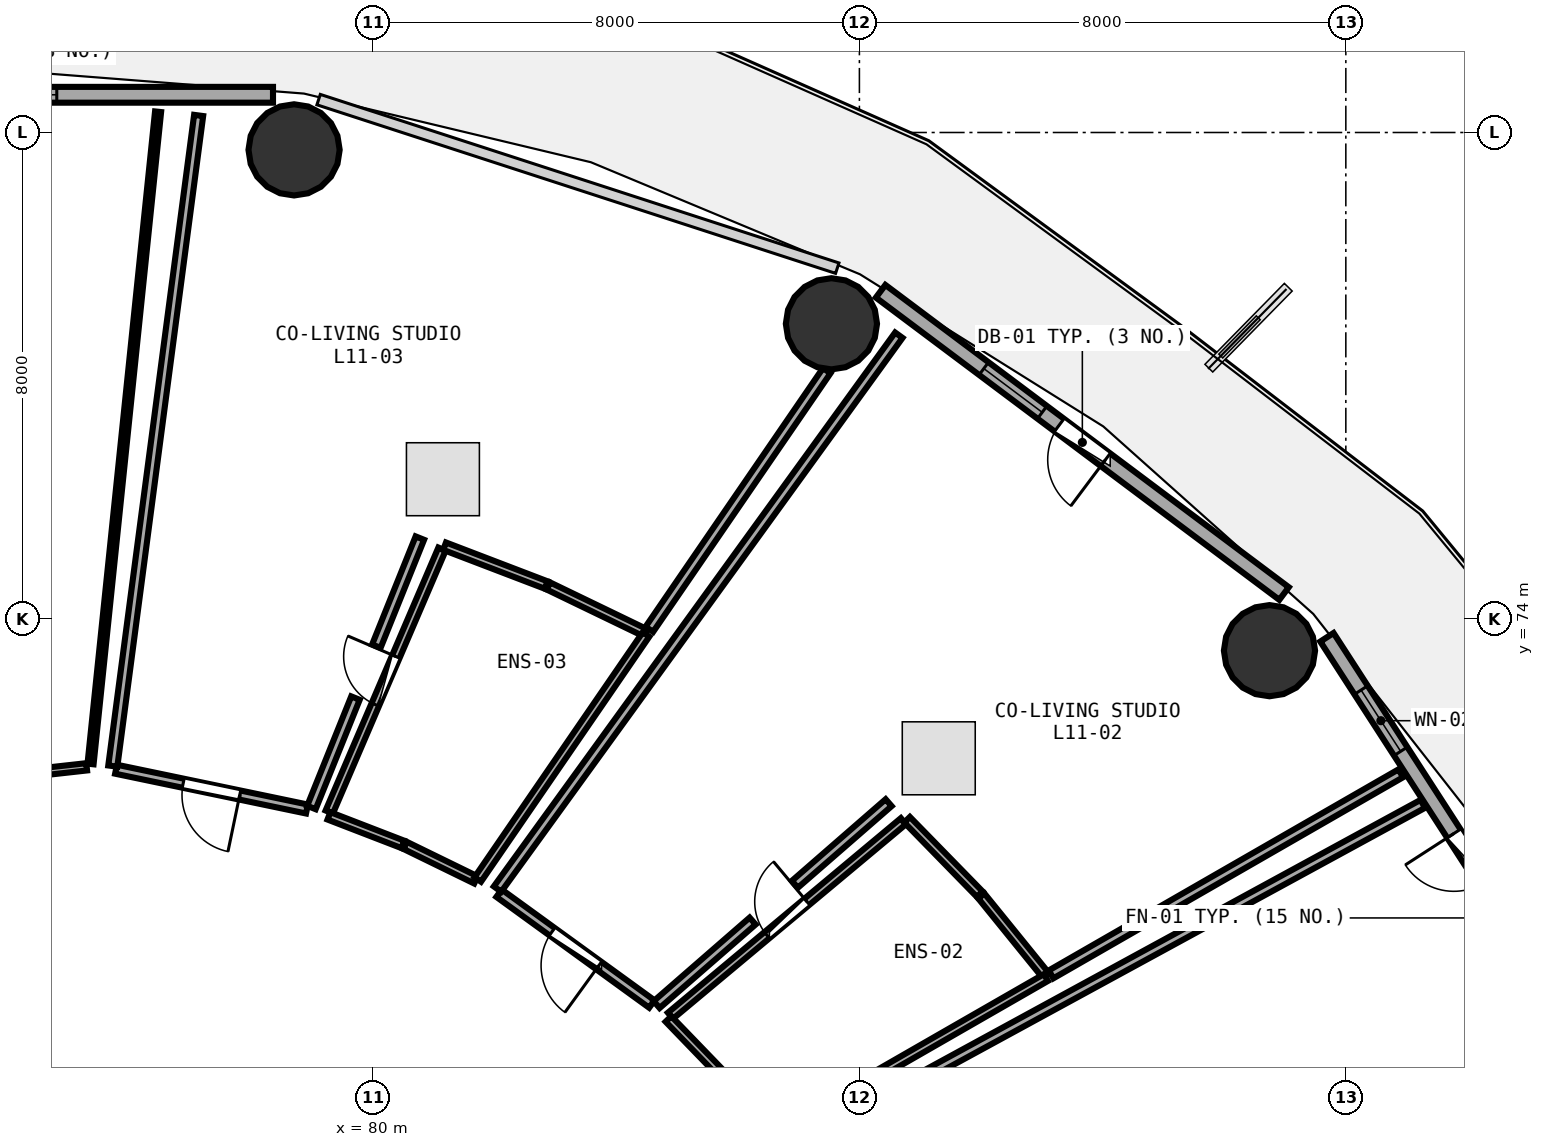
"""IFC4 building model, lengths in metres.
Left out: names, types, materials, properties, quantities, classifications, styles, units other than length and angle.
Written with IfcOpenShell. Run it as: python <this file> out.ifc"""

import sys

from ifc_helpers import new_model, si_unit, direction, frame, frame_2d, origin, origin_2d, place, context, subcontext, project, spatial, rectangle, circle, extrude, element, fill, save


model = new_model("IFC4")
c1 = context("Model", 3, precision=1e-05, world=origin(), true_north=direction((0.0, 1.0)))
c2 = subcontext(c1, "Body", "Model", "MODEL_VIEW")
j1 = project(units=[si_unit("LENGTHUNIT", "METRE"), si_unit("PLANEANGLEUNIT", "RADIAN")], contexts=[c1])
p1 = place(None, origin())
s1 = spatial("IfcSite", under=j1, at=p1, CompositionType="ELEMENT")
p2 = place(p1, origin())
s2 = spatial("IfcBuilding", under=s1, at=p2, CompositionType="ELEMENT")
p3 = place(p2, frame((0.0, 0.0, 45.0)))
s3 = spatial("IfcBuildingStorey", under=s2, at=p3, CompositionType="ELEMENT", Elevation=45.0)
for number, where, z_axis, x_axis in (
    (1, (94.744, 73.478, 0.0), (0.0, 0.0, 1.0), (1.0, 0.0, 0.0)),
    (2, (87.54, 78.854, 0.0), (0.0, 0.0, 1.0), (1.0, 0.0, 0.0)),
    (3, (78.702, 81.714, 0.0), (0.0, 0.0, 1.0), (1.0, 0.0, 0.0)),
):
    element("IfcColumn", number, at=place(p3, frame(where, z_axis=z_axis, x_axis=x_axis)), inside=s3, PredefinedType="COLUMN", context=c2, shape_type="SweptSolid", body=[
        extrude(circle(Radius=0.75, at=origin_2d()), origin(), (0.0, 0.0, 1.0), 3.75),
    ])
p4 = place(p3, frame((99.999, 67.033, 0.0), z_axis=(0.0, 0.0, 1.0), x_axis=(-0.543005114258, 0.839729388488, 0.0)))
e4 = element("IfcWall", 4, at=p4, inside=s3, PredefinedType="SOLIDWALL", context=c2, shape_type="SweptSolid", body=[
    extrude(rectangle(XDim=7.938, YDim=0.26, at=frame_2d((3.969, 0.0))), origin(), (0.0, 0.0, 1.0), 3.475),
])
p5 = place(p4, frame((3.144, 0.0, 0.0)))
e5 = element("IfcOpeningElement", 5, at=p5, cuts=e4, PredefinedType="OPENING", context=c2, shape_type="SweptSolid", body=[
    extrude(rectangle(XDim=0.95, YDim=2.1, at=frame_2d((0.475, 1.05))), frame((0.0, 0.14, 0.0), z_axis=(0.0, -1.0, 0.0), x_axis=(1.0, 0.0, 0.0)), (0.0, 0.0, 1.0), 0.28),
])
p6 = place(p4, frame((5.704, 0.0, 0.85)))
e6 = element("IfcOpeningElement", 6, at=p6, cuts=e4, PredefinedType="OPENING", context=c2, shape_type="SweptSolid", body=[
    extrude(rectangle(XDim=1.2, YDim=1.45, at=frame_2d((0.6, 0.725))), frame((0.0, 0.14, 0.0), z_axis=(0.0, -1.0, 0.0), x_axis=(1.0, 0.0, 0.0)), (0.0, 0.0, 1.0), 0.28),
])
p7 = place(p3, frame((94.984, 74.418, 0.0), z_axis=(0.0, 0.0, 1.0), x_axis=(-0.80030733173, 0.599590005569, 0.0)))
e7 = element("IfcWall", 7, at=p7, inside=s3, PredefinedType="SOLIDWALL", context=c2, shape_type="SweptSolid", body=[
    extrude(rectangle(XDim=8.291, YDim=0.26, at=frame_2d((4.145, 0.0))), origin(), (0.0, 0.0, 1.0), 3.475),
])
p8 = place(p7, frame((3.67, 0.0, 0.0)))
e8 = element("IfcOpeningElement", 8, at=p8, cuts=e7, PredefinedType="OPENING", context=c2, shape_type="SweptSolid", body=[
    extrude(rectangle(XDim=0.95, YDim=2.1, at=frame_2d((0.475, 1.05))), frame((0.0, 0.14, 0.0), z_axis=(0.0, -1.0, 0.0), x_axis=(1.0, 0.0, 0.0)), (0.0, 0.0, 1.0), 0.28),
])
p9 = place(p7, frame((4.97, 0.0, 0.85)))
e9 = element("IfcOpeningElement", 9, at=p9, cuts=e7, PredefinedType="OPENING", context=c2, shape_type="SweptSolid", body=[
    extrude(rectangle(XDim=1.2, YDim=1.45, at=frame_2d((0.6, 0.725))), frame((0.0, 0.14, 0.0), z_axis=(0.0, -1.0, 0.0), x_axis=(1.0, 0.0, 0.0)), (0.0, 0.0, 1.0), 0.28),
])
p10 = place(p3, frame((78.356, 82.62, 0.0), z_axis=(0.0, 0.0, 1.0), x_axis=(-1.0, 0.0, 0.0)))
e10 = element("IfcWall", 10, at=p10, inside=s3, PredefinedType="SOLIDWALL", context=c2, shape_type="SweptSolid", body=[
    extrude(rectangle(XDim=8.712, YDim=0.26, at=frame_2d((4.356, 0.0))), origin(), (0.0, 0.0, 1.0), 3.475),
])
p11 = place(p10, frame((3.556, 0.0, 0.85)))
e11 = element("IfcOpeningElement", 11, at=p11, cuts=e10, PredefinedType="OPENING", context=c2, shape_type="SweptSolid", body=[
    extrude(rectangle(XDim=1.6, YDim=1.45, at=frame_2d((0.8, 0.725))), frame((0.0, 0.14, 0.0), z_axis=(0.0, -1.0, 0.0), x_axis=(1.0, 0.0, 0.0)), (0.0, 0.0, 1.0), 0.28),
])
p12 = place(p3, frame((84.892, 67.475, 0.0), z_axis=(0.0, 0.0, 1.0), x_axis=(0.767551433238, 0.64098736129, 0.0)))
e12 = element("IfcWall", 12, at=p12, inside=s3, PredefinedType="PLUMBINGWALL", context=c2, shape_type="SweptSolid", body=[
    extrude(rectangle(XDim=4.992, YDim=0.13, at=frame_2d((2.496, 0.0))), origin(), (0.0, 0.0, 1.0), 3.175),
])
p13 = place(p12, frame((2.066, 0.0, 0.0)))
e13 = element("IfcOpeningElement", 13, at=p13, cuts=e12, PredefinedType="OPENING", context=c2, shape_type="SweptSolid", body=[
    extrude(rectangle(XDim=0.86, YDim=2.05, at=frame_2d((0.43, 1.025))), frame((0.0, 0.075, 0.0), z_axis=(0.0, -1.0, 0.0), x_axis=(1.0, 0.0, 0.0)), (0.0, 0.0, 1.0), 0.15),
])
p14 = place(p3, frame((84.586, 67.667, 0.0), z_axis=(0.0, 0.0, 1.0), x_axis=(-0.80951419377, 0.587100306664, 0.0)))
e14 = element("IfcWall", 14, at=p14, inside=s3, PredefinedType="PARTITIONING", context=c2, shape_type="SweptSolid", body=[
    extrude(rectangle(XDim=3.104, YDim=0.15, at=frame_2d((1.552, 0.0))), origin(), (0.0, 0.0, 1.0), 2.875),
])
p15 = place(p14, frame((1.077, 0.0, 0.0)))
e15 = element("IfcOpeningElement", 15, at=p15, cuts=e14, PredefinedType="OPENING", context=c2, shape_type="SweptSolid", body=[
    extrude(rectangle(XDim=0.95, YDim=2.08, at=frame_2d((0.475, 1.04))), frame((0.0, 0.085, 0.0), z_axis=(0.0, -1.0, 0.0), x_axis=(1.0, 0.0, 0.0)), (0.0, 0.0, 1.0), 0.17),
])
p16 = place(p3, frame((79.281, 70.824, 0.0), z_axis=(0.0, 0.0, 1.0), x_axis=(0.394194788946, 0.919026913843, 0.0)))
e16 = element("IfcWall", 16, at=p16, inside=s3, PredefinedType="PLUMBINGWALL", context=c2, shape_type="SweptSolid", body=[
    extrude(rectangle(XDim=4.706, YDim=0.13, at=frame_2d((2.353, 0.0))), origin(), (0.0, 0.0, 1.0), 2.875),
])
p17 = place(p16, frame((1.923, 0.0, 0.0)))
e17 = element("IfcOpeningElement", 17, at=p17, cuts=e16, PredefinedType="OPENING", context=c2, shape_type="SweptSolid", body=[
    extrude(rectangle(XDim=0.86, YDim=2.05, at=frame_2d((0.43, 1.025))), frame((0.0, 0.075, 0.0), z_axis=(0.0, -1.0, 0.0), x_axis=(1.0, 0.0, 0.0)), (0.0, 0.0, 1.0), 0.15),
])
p18 = place(p3, frame((78.914, 70.874, 0.0), z_axis=(0.0, 0.0, 1.0), x_axis=(-0.978952544969, 0.204088007237, 0.0)))
e18 = element("IfcWall", 18, at=p18, inside=s3, PredefinedType="PARTITIONING", context=c2, shape_type="SweptSolid", body=[
    extrude(rectangle(XDim=3.207, YDim=0.15, at=frame_2d((1.604, 0.0))), origin(), (0.0, 0.0, 1.0), 3.235),
])
p19 = place(p18, frame((1.129, 0.0, 0.0)))
e19 = element("IfcOpeningElement", 19, at=p19, cuts=e18, PredefinedType="OPENING", context=c2, shape_type="SweptSolid", body=[
    extrude(rectangle(XDim=0.95, YDim=2.08, at=frame_2d((0.475, 1.04))), frame((0.0, 0.085, 0.0), z_axis=(0.0, -1.0, 0.0), x_axis=(1.0, 0.0, 0.0)), (0.0, 0.0, 1.0), 0.17),
])
p20 = place(p3, frame((75.292, 71.568, 0.0), z_axis=(0.0, 0.0, 1.0), x_axis=(-0.993850084324, -0.110733959964, 0.0)))
e20 = element("IfcWall", 20, at=p20, inside=s3, PredefinedType="PARTITIONING", context=c2, shape_type="SweptSolid", body=[
    extrude(rectangle(XDim=6.202, YDim=0.12, at=frame_2d((3.101, 0.0))), origin(), (0.0, 0.0, 1.0), 2.875),
])
p21 = place(p20, frame((2.651, 0.0, 0.0)))
e21 = element("IfcOpeningElement", 21, at=p21, cuts=e20, PredefinedType="OPENING", context=c2, shape_type="SweptSolid", body=[
    extrude(rectangle(XDim=0.9, YDim=2.08, at=frame_2d((0.45, 1.04))), frame((0.0, 0.07, 0.0), z_axis=(0.0, -1.0, 0.0), x_axis=(1.0, 0.0, 0.0)), (0.0, 0.0, 1.0), 0.14),
])
p22 = place(p3, frame((86.779, 65.245, 0.0), z_axis=(0.0, 0.0, 1.0), x_axis=(0.878114235828, 0.478451030761, 0.0)))
e22 = element("IfcWall", 22, at=p22, inside=s3, PredefinedType="PARTITIONING", context=c2, shape_type="SweptSolid", body=[
    extrude(rectangle(XDim=11.942, YDim=0.15, at=frame_2d((5.971, 0.0))), origin(), (0.0, 0.0, 1.0), 2.875),
])
p23 = place(p3, frame((85.73, 66.521, 0.0), z_axis=(0.0, 0.0, 1.0), x_axis=(-0.694622338853, 0.719374593913, 0.0)))
e23 = element("IfcWall", 23, at=p23, inside=s3, PredefinedType="PLUMBINGWALL", context=c2, shape_type="SweptSolid", body=[
    extrude(rectangle(XDim=1.253, YDim=0.13, at=frame_2d((0.626, 0.0))), origin(), (0.0, 0.0, 1.0), 2.875),
])
p24 = place(p3, frame((88.784, 70.699, 0.0), z_axis=(0.0, 0.0, 1.0), x_axis=(0.698493231478, -0.715616661055, 0.0)))
e24 = element("IfcWall", 24, at=p24, inside=s3, PredefinedType="PLUMBINGWALL", context=c2, shape_type="SweptSolid", body=[
    extrude(rectangle(XDim=1.711, YDim=0.13, at=frame_2d((0.855, 0.0))), origin(), (0.0, 0.0, 1.0), 2.875),
])
p25 = place(p3, frame((90.006, 69.445, 0.0), z_axis=(0.0, 0.0, 1.0), x_axis=(0.629707963092, -0.776831951723, 0.0)))
e25 = element("IfcWall", 25, at=p25, inside=s3, PredefinedType="PLUMBINGWALL", context=c2, shape_type="SweptSolid", body=[
    extrude(rectangle(XDim=1.694, YDim=0.13, at=frame_2d((0.847, 0.0))), origin(), (0.0, 0.0, 1.0), 3.175),
])
p26 = place(p3, frame((91.068, 68.103, 0.0), z_axis=(0.0, 0.0, 1.0), x_axis=(-0.867165143158, -0.498020696851, 0.0)))
e26 = element("IfcWall", 26, at=p26, inside=s3, PredefinedType="PLUMBINGWALL", context=c2, shape_type="SweptSolid", body=[
    extrude(rectangle(XDim=5.194, YDim=0.13, at=frame_2d((2.597, 0.0))), origin(), (0.0, 0.0, 1.0), 2.875),
])
p27 = place(p3, frame((82.049, 69.557, 0.0), z_axis=(0.0, 0.0, 1.0), x_axis=(0.586718941426, 0.809790641939, 0.0)))
e27 = element("IfcWall", 27, at=p27, inside=s3, PredefinedType="PARTITIONING", context=c2, shape_type="SweptSolid", body=[
    extrude(rectangle(XDim=11.249, YDim=0.15, at=frame_2d((5.625, 0.0))), origin(), (0.0, 0.0, 1.0), 2.875),
])
p28 = place(p3, frame((96.903, 71.461, 0.0), z_axis=(0.0, 0.0, 1.0), x_axis=(-0.866924194656, -0.498440007142, 0.0)))
e28 = element("IfcWall", 28, at=p28, inside=s3, PredefinedType="PARTITIONING", context=c2, shape_type="SweptSolid", body=[
    extrude(rectangle(XDim=6.634, YDim=0.15, at=frame_2d((3.317, 0.0))), origin(), (0.0, 0.0, 1.0), 2.875),
])
p29 = place(p3, frame((88.481, 70.979, 0.0), z_axis=(0.0, 0.0, 1.0), x_axis=(-0.754356172394, -0.656465357176, 0.0)))
e29 = element("IfcWall", 29, at=p29, inside=s3, PredefinedType="PARTITIONING", context=c2, shape_type="SweptSolid", body=[
    extrude(rectangle(XDim=2.045, YDim=0.15, at=frame_2d((1.022, 0.0))), origin(), (0.0, 0.0, 1.0), 3.175),
])
p30 = place(p3, frame((86.244, 69.032, 0.0), z_axis=(0.0, 0.0, 1.0), x_axis=(-0.754351792987, -0.656470389597, 0.0)))
e30 = element("IfcWall", 30, at=p30, inside=s3, PredefinedType="PARTITIONING", context=c2, shape_type="SweptSolid", body=[
    extrude(rectangle(XDim=2.093, YDim=0.15, at=frame_2d((1.046, 0.0))), origin(), (0.0, 0.0, 1.0), 3.235),
])
p31 = place(p3, frame((81.694, 69.708, 0.0), z_axis=(0.0, 0.0, 1.0), x_axis=(-0.898753964496, 0.43845331713, 0.0)))
e31 = element("IfcWall", 31, at=p31, inside=s3, PredefinedType="PLUMBINGWALL", context=c2, shape_type="SweptSolid", body=[
    extrude(rectangle(XDim=1.296, YDim=0.13, at=frame_2d((0.648, 0.0))), origin(), (0.0, 0.0, 1.0), 2.875),
])
p32 = place(p3, frame((80.492, 70.292, 0.0), z_axis=(0.0, 0.0, 1.0), x_axis=(-0.932939679843, 0.360032712089, 0.0)))
e32 = element("IfcWall", 32, at=p32, inside=s3, PredefinedType="PLUMBINGWALL", context=c2, shape_type="SweptSolid", body=[
    extrude(rectangle(XDim=1.304, YDim=0.13, at=frame_2d((0.652, 0.0))), origin(), (0.0, 0.0, 1.0), 3.48),
])
p33 = place(p3, frame((81.178, 75.197, 0.0), z_axis=(0.0, 0.0, 1.0), x_axis=(0.934026387995, -0.357204012477, 0.0)))
e33 = element("IfcWall", 33, at=p33, inside=s3, PredefinedType="PLUMBINGWALL", context=c2, shape_type="SweptSolid", body=[
    extrude(rectangle(XDim=1.789, YDim=0.13, at=frame_2d((0.894, 0.0))), origin(), (0.0, 0.0, 1.0), 3.48),
])
p34 = place(p3, frame((82.885, 74.542, 0.0), z_axis=(0.0, 0.0, 1.0), x_axis=(0.900637023717, -0.434572147648, 0.0)))
e34 = element("IfcWall", 34, at=p34, inside=s3, PredefinedType="PLUMBINGWALL", context=c2, shape_type="SweptSolid", body=[
    extrude(rectangle(XDim=1.775, YDim=0.13, at=frame_2d((0.888, 0.0))), origin(), (0.0, 0.0, 1.0), 3.48),
])
p35 = place(p3, frame((84.491, 73.746, 0.0), z_axis=(0.0, 0.0, 1.0), x_axis=(-0.566068810651, -0.824357993597, 0.0)))
e35 = element("IfcWall", 35, at=p35, inside=s3, PredefinedType="PLUMBINGWALL", context=c2, shape_type="SweptSolid", body=[
    extrude(rectangle(XDim=4.889, YDim=0.13, at=frame_2d((2.444, 0.0))), origin(), (0.0, 0.0, 1.0), 3.175),
])
p36 = place(p3, frame((75.721, 71.581, 0.0), z_axis=(0.0, 0.0, 1.0), x_axis=(0.130800348515, 0.991408729449, 0.0)))
e36 = element("IfcWall", 36, at=p36, inside=s3, PredefinedType="PARTITIONING", context=c2, shape_type="SweptSolid", body=[
    extrude(rectangle(XDim=10.792, YDim=0.15, at=frame_2d((5.396, 0.0))), origin(), (0.0, 0.0, 1.0), 2.875),
])
p37 = place(p3, frame((87.463, 78.083, 0.0), z_axis=(0.0, 0.0, 1.0), x_axis=(-0.565642433627, -0.824650615279, 0.0)))
e37 = element("IfcWall", 37, at=p37, inside=s3, PredefinedType="PARTITIONING", context=c2, shape_type="SweptSolid", body=[
    extrude(rectangle(XDim=5.157, YDim=0.15, at=frame_2d((2.579, 0.0))), origin(), (0.0, 0.0, 1.0), 2.875),
])
p38 = place(p3, frame((80.771, 75.33, 0.0), z_axis=(0.0, 0.0, 1.0), x_axis=(-0.373257508911, -0.927727779061, 0.0)))
e38 = element("IfcWall", 38, at=p38, inside=s3, PredefinedType="PARTITIONING", context=c2, shape_type="SweptSolid", body=[
    extrude(rectangle(XDim=1.916, YDim=0.15, at=frame_2d((0.958, 0.0))), origin(), (0.0, 0.0, 1.0), 2.875),
])
p39 = place(p3, frame((79.712, 72.699, 0.0), z_axis=(0.0, 0.0, 1.0), x_axis=(-0.373407797427, -0.927667298562, 0.0)))
e39 = element("IfcWall", 39, at=p39, inside=s3, PredefinedType="PARTITIONING", context=c2, shape_type="SweptSolid", body=[
    extrude(rectangle(XDim=1.94, YDim=0.15, at=frame_2d((0.97, 0.0))), origin(), (0.0, 0.0, 1.0), 3.235),
])
p40 = place(p3, frame((76.466, 82.341, 0.0), z_axis=(0.0, 0.0, 1.0), x_axis=(-0.103008831227, -0.994680441493, 0.0)))
e40 = element("IfcWall", 40, at=p40, inside=s3, PredefinedType="PARTITIONING", context=c2, shape_type="SweptSolid", body=[
    extrude(rectangle(XDim=10.784, YDim=0.1, at=frame_2d((5.392, 0.0))), origin(), (0.0, 0.0, 1.0), 2.875),
])
p41 = place(p5, frame((0.95, 0.0, 0.0), z_axis=(0.0, 0.0, 1.0), x_axis=(-1.0, 0.0, 0.0)))
e41 = element("IfcDoor", 41, at=p41, inside=s3, OperationType="SINGLE_SWING_LEFT", PredefinedType="DOOR", context=c2, shape_type="SweptSolid", body=[
    extrude(rectangle(XDim=0.95, YDim=2.1, at=frame_2d((0.475, 1.05))), frame((0.0, 0.025, 0.0), z_axis=(0.0, -1.0, 0.0), x_axis=(1.0, 0.0, 0.0)), (0.0, 0.0, 1.0), 0.05),
])
fill(e5, e41)
p42 = place(p6, origin())
e42 = element("IfcWindow", 42, at=p42, inside=s3, PartitioningType="SINGLE_PANEL", PredefinedType="WINDOW", context=c2, shape_type="SweptSolid", body=[
    extrude(rectangle(XDim=1.2, YDim=1.45, at=frame_2d((0.6, 0.725))), frame((0.0, 0.03, 0.0), z_axis=(0.0, -1.0, 0.0), x_axis=(1.0, 0.0, 0.0)), (0.0, 0.0, 1.0), 0.06),
])
fill(e6, e42)
p43 = place(p8, frame((0.95, 0.0, 0.0), z_axis=(0.0, 0.0, 1.0), x_axis=(-1.0, 0.0, 0.0)))
e43 = element("IfcDoor", 43, at=p43, inside=s3, OperationType="SINGLE_SWING_RIGHT", PredefinedType="DOOR", context=c2, shape_type="SweptSolid", body=[
    extrude(rectangle(XDim=0.95, YDim=2.1, at=frame_2d((0.475, 1.05))), frame((0.0, 0.025, 0.0), z_axis=(0.0, -1.0, 0.0), x_axis=(1.0, 0.0, 0.0)), (0.0, 0.0, 1.0), 0.05),
])
fill(e8, e43)
p44 = place(p9, origin())
e44 = element("IfcWindow", 44, at=p44, inside=s3, PartitioningType="SINGLE_PANEL", PredefinedType="WINDOW", context=c2, shape_type="SweptSolid", body=[
    extrude(rectangle(XDim=1.2, YDim=1.45, at=frame_2d((0.6, 0.725))), frame((0.0, 0.03, 0.0), z_axis=(0.0, -1.0, 0.0), x_axis=(1.0, 0.0, 0.0)), (0.0, 0.0, 1.0), 0.06),
])
fill(e9, e44)
p45 = place(p11, origin())
e45 = element("IfcWindow", 45, at=p45, inside=s3, PartitioningType="SINGLE_PANEL", PredefinedType="WINDOW", context=c2, shape_type="SweptSolid", body=[
    extrude(rectangle(XDim=1.6, YDim=1.45, at=frame_2d((0.8, 0.725))), frame((0.0, 0.03, 0.0), z_axis=(0.0, -1.0, 0.0), x_axis=(1.0, 0.0, 0.0)), (0.0, 0.0, 1.0), 0.06),
])
fill(e11, e45)
p46 = place(p13, origin())
e46 = element("IfcDoor", 46, at=p46, inside=s3, OperationType="SINGLE_SWING_RIGHT", PredefinedType="DOOR", context=c2, shape_type="SweptSolid", body=[
    extrude(rectangle(XDim=0.86, YDim=2.05, at=frame_2d((0.43, 1.025))), frame((0.0, 0.025, 0.0), z_axis=(0.0, -1.0, 0.0), x_axis=(1.0, 0.0, 0.0)), (0.0, 0.0, 1.0), 0.05),
])
fill(e13, e46)
p47 = place(p15, origin())
e47 = element("IfcDoor", 47, at=p47, inside=s3, OperationType="SINGLE_SWING_LEFT", PredefinedType="DOOR", context=c2, shape_type="SweptSolid", body=[
    extrude(rectangle(XDim=0.95, YDim=2.08, at=frame_2d((0.475, 1.04))), frame((0.0, 0.025, 0.0), z_axis=(0.0, -1.0, 0.0), x_axis=(1.0, 0.0, 0.0)), (0.0, 0.0, 1.0), 0.05),
])
fill(e15, e47)
p48 = place(p17, origin())
e48 = element("IfcDoor", 48, at=p48, inside=s3, OperationType="SINGLE_SWING_RIGHT", PredefinedType="DOOR", context=c2, shape_type="SweptSolid", body=[
    extrude(rectangle(XDim=0.86, YDim=2.05, at=frame_2d((0.43, 1.025))), frame((0.0, 0.025, 0.0), z_axis=(0.0, -1.0, 0.0), x_axis=(1.0, 0.0, 0.0)), (0.0, 0.0, 1.0), 0.05),
])
fill(e17, e48)
p49 = place(p19, origin())
e49 = element("IfcDoor", 49, at=p49, inside=s3, OperationType="SINGLE_SWING_LEFT", PredefinedType="DOOR", context=c2, shape_type="SweptSolid", body=[
    extrude(rectangle(XDim=0.95, YDim=2.08, at=frame_2d((0.475, 1.04))), frame((0.0, 0.025, 0.0), z_axis=(0.0, -1.0, 0.0), x_axis=(1.0, 0.0, 0.0)), (0.0, 0.0, 1.0), 0.05),
])
fill(e19, e49)
save(model, sys.argv[1])
